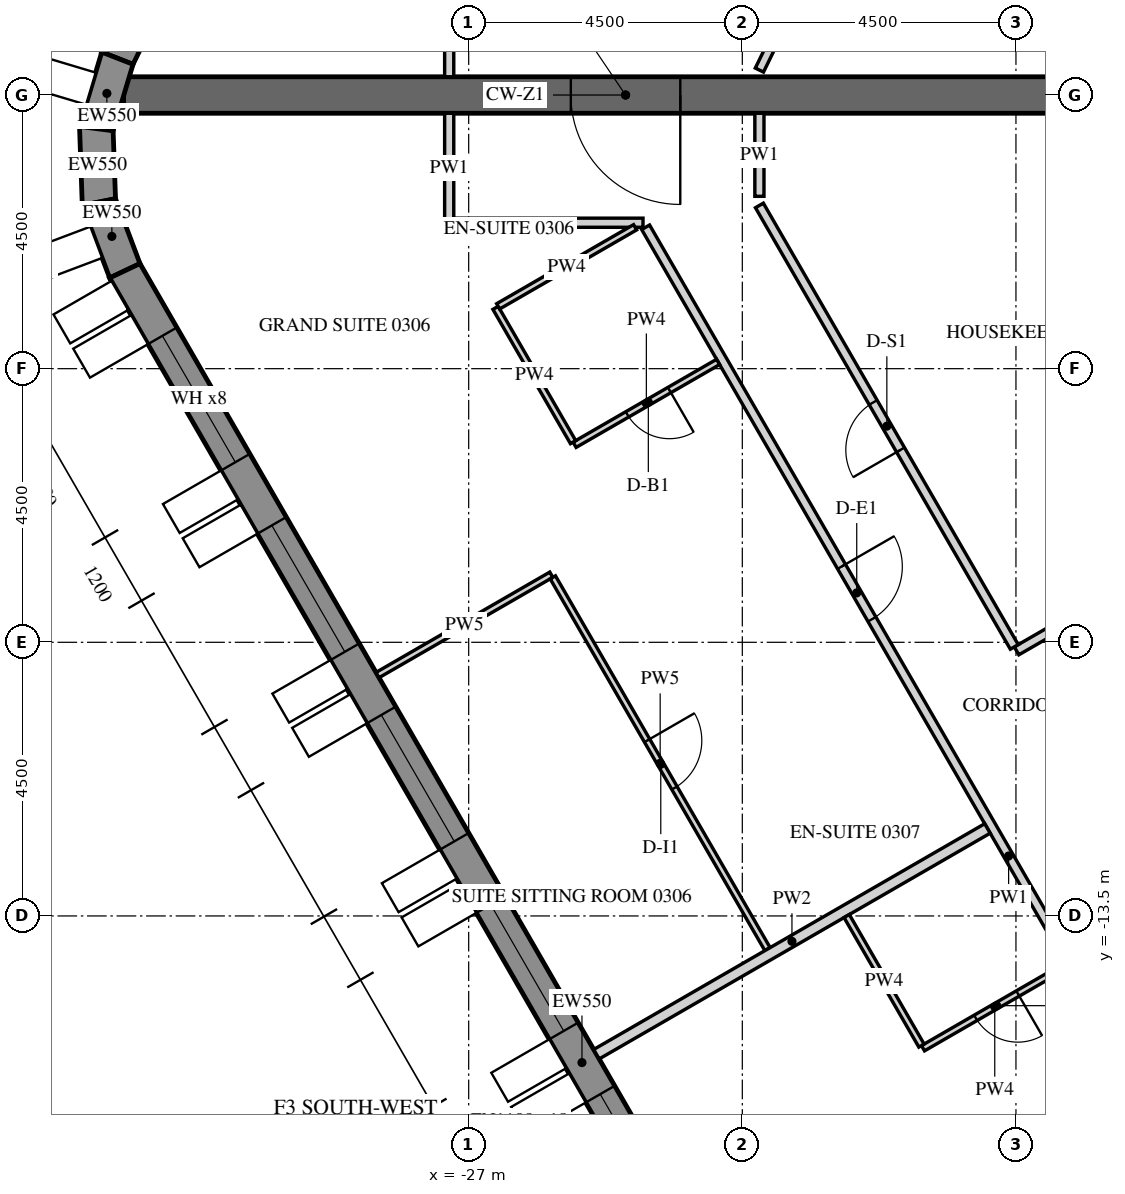
"""IFC4 building model, lengths in metres.
Left out: names, types, materials, properties, quantities, classifications, styles, units other than length and angle.
Written with IfcOpenShell. Run it as: python <this file> out.ifc"""

import sys

from ifc_helpers import new_model, si_unit, direction, frame, frame_2d, origin, place, context, subcontext, project, spatial, polyline, rectangle, outline, extrude, element, fill, save


model = new_model("IFC4")
c1 = context("Model", 3, precision=1e-05, world=origin(), true_north=direction((0.0, 1.0)))
c2 = subcontext(c1, "Body", "Model", "MODEL_VIEW")
j1 = project(units=[si_unit("LENGTHUNIT", "METRE"), si_unit("PLANEANGLEUNIT", "RADIAN")], contexts=[c1])
p1 = place(None, origin())
s1 = spatial("IfcSite", under=j1, at=p1, CompositionType="ELEMENT")
p2 = place(p1, origin())
s2 = spatial("IfcBuilding", under=s1, at=p2, CompositionType="ELEMENT")
p3 = place(p2, frame((0.0, 0.0, 60.9)))
s3 = spatial("IfcBuildingStorey", under=s2, at=p3, CompositionType="ELEMENT", Elevation=60.9)
p4 = place(p3, frame((-19.595, 27.633, -0.15), z_axis=(0.0, 0.0, 1.0), x_axis=(-0.438368285794, -0.898795441694, 0.0)))
e1 = element("IfcWall", 1, at=p4, inside=s3, PredefinedType="SOLIDWALL", context=c2, shape_type="SweptSolid", body=[
    extrude(outline(polyline([(-0.026, -0.275), (30.093, -0.275), (30.048, 0.275), (0.026, 0.275), (-0.026, -0.275)])), origin(), (0.0, 0.0, 1.0), 3.9),
])
p5 = place(p4, frame((1.236, 0.0, 1.05)))
e2 = element("IfcOpeningElement", 2, at=p5, cuts=e1, PredefinedType="OPENING", context=c2, shape_type="SweptSolid", body=[
    extrude(rectangle(XDim=2.4, YDim=2.4, at=frame_2d((1.2, 1.2))), frame((0.0, 0.285, 0.0), z_axis=(0.0, -1.0, 0.0), x_axis=(1.0, 0.0, 0.0)), (0.0, 0.0, 1.0), 0.57),
])
p6 = place(p4, frame((4.835, 0.0, 1.05)))
e3 = element("IfcOpeningElement", 3, at=p6, cuts=e1, PredefinedType="OPENING", context=c2, shape_type="SweptSolid", body=[
    extrude(rectangle(XDim=2.4, YDim=2.4, at=frame_2d((1.2, 1.2))), frame((0.0, 0.285, 0.0), z_axis=(0.0, -1.0, 0.0), x_axis=(1.0, 0.0, 0.0)), (0.0, 0.0, 1.0), 0.57),
])
p7 = place(p4, frame((8.436, 0.0, 1.05)))
e4 = element("IfcOpeningElement", 4, at=p7, cuts=e1, PredefinedType="OPENING", context=c2, shape_type="SweptSolid", body=[
    extrude(rectangle(XDim=2.4, YDim=2.4, at=frame_2d((1.2, 1.2))), frame((0.0, 0.285, 0.0), z_axis=(0.0, -1.0, 0.0), x_axis=(1.0, 0.0, 0.0)), (0.0, 0.0, 1.0), 0.57),
])
p8 = place(p4, frame((12.035, 0.0, 1.05)))
e5 = element("IfcOpeningElement", 5, at=p8, cuts=e1, PredefinedType="OPENING", context=c2, shape_type="SweptSolid", body=[
    extrude(rectangle(XDim=2.4, YDim=2.4, at=frame_2d((1.2, 1.2))), frame((0.0, 0.285, 0.0), z_axis=(0.0, -1.0, 0.0), x_axis=(1.0, 0.0, 0.0)), (0.0, 0.0, 1.0), 0.57),
])
p9 = place(p4, frame((15.635, 0.0, 1.05)))
e6 = element("IfcOpeningElement", 6, at=p9, cuts=e1, PredefinedType="OPENING", context=c2, shape_type="SweptSolid", body=[
    extrude(rectangle(XDim=2.4, YDim=2.4, at=frame_2d((1.2, 1.2))), frame((0.0, 0.285, 0.0), z_axis=(0.0, -1.0, 0.0), x_axis=(1.0, 0.0, 0.0)), (0.0, 0.0, 1.0), 0.57),
])
p10 = place(p4, frame((19.236, 0.0, 1.05)))
e7 = element("IfcOpeningElement", 7, at=p10, cuts=e1, PredefinedType="OPENING", context=c2, shape_type="SweptSolid", body=[
    extrude(rectangle(XDim=2.4, YDim=2.4, at=frame_2d((1.2, 1.2))), frame((0.0, 0.285, 0.0), z_axis=(0.0, -1.0, 0.0), x_axis=(1.0, 0.0, 0.0)), (0.0, 0.0, 1.0), 0.57),
])
p11 = place(p4, frame((22.835, 0.0, 1.05)))
e8 = element("IfcOpeningElement", 8, at=p11, cuts=e1, PredefinedType="OPENING", context=c2, shape_type="SweptSolid", body=[
    extrude(rectangle(XDim=2.4, YDim=2.4, at=frame_2d((1.2, 1.2))), frame((0.0, 0.285, 0.0), z_axis=(0.0, -1.0, 0.0), x_axis=(1.0, 0.0, 0.0)), (0.0, 0.0, 1.0), 0.57),
])
p12 = place(p4, frame((26.436, 0.0, 1.05)))
e9 = element("IfcOpeningElement", 9, at=p12, cuts=e1, PredefinedType="OPENING", context=c2, shape_type="SweptSolid", body=[
    extrude(rectangle(XDim=2.4, YDim=2.4, at=frame_2d((1.2, 1.2))), frame((0.0, 0.285, 0.0), z_axis=(0.0, -1.0, 0.0), x_axis=(1.0, 0.0, 0.0)), (0.0, 0.0, 1.0), 0.57),
])
p13 = place(p3, frame((-32.777, 0.605, -0.15), z_axis=(0.0, 0.0, 1.0), x_axis=(-0.286921497463, -0.957954098219, 0.0)))
e10 = element("IfcWall", 10, at=p13, inside=s3, PredefinedType="SOLIDWALL", context=c2, shape_type="SweptSolid", body=[
    extrude(outline(polyline([(-0.022, -0.275), (1.253, -0.275), (1.163, 0.275), (0.022, 0.275), (-0.022, -0.275)])), origin(), (0.0, 0.0, 1.0), 3.9),
])
p14 = place(p3, frame((-33.124, -0.552, -0.15), z_axis=(0.0, 0.0, 1.0), x_axis=(0.03495638276, -0.999388838893, 0.0)))
e11 = element("IfcWall", 11, at=p14, inside=s3, PredefinedType="SOLIDWALL", context=c2, shape_type="SweptSolid", body=[
    extrude(outline(polyline([(-0.045, -0.275), (1.253, -0.275), (1.163, 0.275), (0.045, 0.275), (-0.045, -0.275)])), origin(), (0.0, 0.0, 1.0), 3.9),
])
p15 = place(p3, frame((-33.081, -1.76, -0.15), z_axis=(0.0, 0.0, 1.0), x_axis=(0.353027214741, -0.935613053378, 0.0)))
e12 = element("IfcWall", 12, at=p15, inside=s3, PredefinedType="SOLIDWALL", context=c2, shape_type="SweptSolid", body=[
    extrude(outline(polyline([(-0.045, -0.275), (1.231, -0.275), (1.186, 0.275), (0.045, 0.275), (-0.045, -0.275)])), origin(), (0.0, 0.0, 1.0), 3.9),
])
p16 = place(p3, frame((-32.655, -2.89, -0.15), z_axis=(0.0, 0.0, 1.0), x_axis=(0.499997711317, -0.866026725152, 0.0)))
e13 = element("IfcWall", 13, at=p16, inside=s3, PredefinedType="SOLIDWALL", context=c2, shape_type="SweptSolid", body=[
    extrude(outline(polyline([(-0.022, -0.275), (30.097, -0.275), (30.045, 0.275), (0.022, 0.275), (-0.022, -0.275)])), origin(), (0.0, 0.0, 1.0), 3.9),
])
p17 = place(p16, frame((1.236, 0.0, 1.05)))
e14 = element("IfcOpeningElement", 14, at=p17, cuts=e13, PredefinedType="OPENING", context=c2, shape_type="SweptSolid", body=[
    extrude(rectangle(XDim=2.4, YDim=2.4, at=frame_2d((1.2, 1.2))), frame((0.0, 0.285, 0.0), z_axis=(0.0, -1.0, 0.0), x_axis=(1.0, 0.0, 0.0)), (0.0, 0.0, 1.0), 0.57),
])
p18 = place(p16, frame((4.835, 0.0, 1.05)))
e15 = element("IfcOpeningElement", 15, at=p18, cuts=e13, PredefinedType="OPENING", context=c2, shape_type="SweptSolid", body=[
    extrude(rectangle(XDim=2.4, YDim=2.4, at=frame_2d((1.2, 1.2))), frame((0.0, 0.285, 0.0), z_axis=(0.0, -1.0, 0.0), x_axis=(1.0, 0.0, 0.0)), (0.0, 0.0, 1.0), 0.57),
])
p19 = place(p16, frame((8.436, 0.0, 1.05)))
e16 = element("IfcOpeningElement", 16, at=p19, cuts=e13, PredefinedType="OPENING", context=c2, shape_type="SweptSolid", body=[
    extrude(rectangle(XDim=2.4, YDim=2.4, at=frame_2d((1.2, 1.2))), frame((0.0, 0.285, 0.0), z_axis=(0.0, -1.0, 0.0), x_axis=(1.0, 0.0, 0.0)), (0.0, 0.0, 1.0), 0.57),
])
p20 = place(p16, frame((12.035, 0.0, 1.05)))
e17 = element("IfcOpeningElement", 17, at=p20, cuts=e13, PredefinedType="OPENING", context=c2, shape_type="SweptSolid", body=[
    extrude(rectangle(XDim=2.4, YDim=2.4, at=frame_2d((1.2, 1.2))), frame((0.0, 0.285, 0.0), z_axis=(0.0, -1.0, 0.0), x_axis=(1.0, 0.0, 0.0)), (0.0, 0.0, 1.0), 0.57),
])
p21 = place(p16, frame((15.635, 0.0, 1.05)))
e18 = element("IfcOpeningElement", 18, at=p21, cuts=e13, PredefinedType="OPENING", context=c2, shape_type="SweptSolid", body=[
    extrude(rectangle(XDim=2.4, YDim=2.4, at=frame_2d((1.2, 1.2))), frame((0.0, 0.285, 0.0), z_axis=(0.0, -1.0, 0.0), x_axis=(1.0, 0.0, 0.0)), (0.0, 0.0, 1.0), 0.57),
])
p22 = place(p16, frame((19.236, 0.0, 1.05)))
e19 = element("IfcOpeningElement", 19, at=p22, cuts=e13, PredefinedType="OPENING", context=c2, shape_type="SweptSolid", body=[
    extrude(rectangle(XDim=2.4, YDim=2.4, at=frame_2d((1.2, 1.2))), frame((0.0, 0.285, 0.0), z_axis=(0.0, -1.0, 0.0), x_axis=(1.0, 0.0, 0.0)), (0.0, 0.0, 1.0), 0.57),
])
p23 = place(p16, frame((22.835, 0.0, 1.05)))
e20 = element("IfcOpeningElement", 20, at=p23, cuts=e13, PredefinedType="OPENING", context=c2, shape_type="SweptSolid", body=[
    extrude(rectangle(XDim=2.4, YDim=2.4, at=frame_2d((1.2, 1.2))), frame((0.0, 0.285, 0.0), z_axis=(0.0, -1.0, 0.0), x_axis=(1.0, 0.0, 0.0)), (0.0, 0.0, 1.0), 0.57),
])
p24 = place(p16, frame((26.436, 0.0, 1.05)))
e21 = element("IfcOpeningElement", 21, at=p24, cuts=e13, PredefinedType="OPENING", context=c2, shape_type="SweptSolid", body=[
    extrude(rectangle(XDim=2.4, YDim=2.4, at=frame_2d((1.2, 1.2))), frame((0.0, 0.285, 0.0), z_axis=(0.0, -1.0, 0.0), x_axis=(1.0, 0.0, 0.0)), (0.0, 0.0, 1.0), 0.57),
])
p25 = place(p3, frame((-16.166, 0.0, -0.15), z_axis=(0.0, 0.0, 1.0), x_axis=(-1.0, 0.0, 0.0)))
e22 = element("IfcWall", 22, at=p25, inside=s3, PredefinedType="SHEAR", context=c2, shape_type="SweptSolid", body=[
    extrude(rectangle(XDim=16.509, YDim=0.6, at=frame_2d((8.254, 0.0))), origin(), (0.0, 0.0, 1.0), 3.9),
])
p26 = place(p25, frame((7.354, 0.0, 0.15)))
e23 = element("IfcOpeningElement", 23, at=p26, cuts=e22, PredefinedType="OPENING", context=c2, shape_type="SweptSolid", body=[
    extrude(rectangle(XDim=1.8, YDim=2.4, at=frame_2d((0.9, 1.2))), frame((0.0, 0.31, 0.0), z_axis=(0.0, -1.0, 0.0), x_axis=(1.0, 0.0, 0.0)), (0.0, 0.0, 1.0), 0.62),
])
p27 = place(p3, frame((-27.32, 2.025, 0.0), z_axis=(0.0, 0.0, 1.0), x_axis=(0.0, -1.0, 0.0)))
e24 = element("IfcWall", 24, at=p27, inside=s3, PredefinedType="PARTITIONING", context=c2, shape_type="SweptSolid", body=[
    extrude(rectangle(XDim=1.725, YDim=0.15, at=frame_2d((0.862, 0.0))), origin(), (0.0, 0.0, 1.0), 2.988),
])
p28 = place(p3, frame((-22.219, 0.41, 0.0), z_axis=(0.0, 0.0, 1.0), x_axis=(0.438391891827, 0.898783927972, 0.0)))
e25 = element("IfcWall", 25, at=p28, inside=s3, PredefinedType="PARTITIONING", context=c2, shape_type="SweptSolid", body=[
    extrude(rectangle(XDim=9.699, YDim=0.15, at=frame_2d((4.85, 0.0))), origin(), (0.0, 0.0, 1.0), 2.988),
])
p29 = place(p28, frame((4.4, 0.0, 0.0)))
e26 = element("IfcOpeningElement", 26, at=p29, cuts=e25, PredefinedType="OPENING", context=c2, shape_type="SweptSolid", body=[
    extrude(rectangle(XDim=0.9, YDim=2.1, at=frame_2d((0.45, 1.05))), frame((0.0, 0.085, 0.0), z_axis=(0.0, -1.0, 0.0), x_axis=(1.0, 0.0, 0.0)), (0.0, 0.0, 1.0), 0.17),
])
p30 = place(p3, frame((-27.32, -0.3, 0.0), z_axis=(0.0, 0.0, 1.0), x_axis=(0.0, -1.0, 0.0)))
e27 = element("IfcWall", 27, at=p30, inside=s3, PredefinedType="PARTITIONING", context=c2, shape_type="SweptSolid", body=[
    extrude(rectangle(XDim=1.8, YDim=0.15, at=frame_2d((0.9, 0.0))), origin(), (0.0, 0.0, 1.0), 2.988),
])
p31 = place(p3, frame((-27.245, -2.1, 0.0), z_axis=(0.0, 0.0, 1.0), x_axis=(1.0, 0.0, 0.0)))
e28 = element("IfcWall", 28, at=p31, inside=s3, PredefinedType="PARTITIONING", context=c2, shape_type="SweptSolid", body=[
    extrude(rectangle(XDim=3.112, YDim=0.15, at=frame_2d((1.556, 0.0))), origin(), (0.0, 0.0, 1.0), 2.988),
])
p32 = place(p3, frame((-24.09, -2.175, 0.0), z_axis=(0.0, 0.0, 1.0), x_axis=(0.499996832073, -0.86602723278, 0.0)))
e29 = element("IfcWall", 29, at=p32, inside=s3, PredefinedType="PARTITIONING", context=c2, shape_type="SweptSolid", body=[
    extrude(rectangle(XDim=23.877, YDim=0.15, at=frame_2d((11.938, 0.0))), origin(), (0.0, 0.0, 1.0), 2.988),
])
p33 = place(p32, frame((6.443, 0.0, 0.0)))
e30 = element("IfcOpeningElement", 30, at=p33, cuts=e29, PredefinedType="OPENING", context=c2, shape_type="SweptSolid", body=[
    extrude(rectangle(XDim=1.0, YDim=2.1, at=frame_2d((0.5, 1.05))), frame((0.0, 0.085, 0.0), z_axis=(0.0, -1.0, 0.0), x_axis=(1.0, 0.0, 0.0)), (0.0, 0.0, 1.0), 0.17),
])
p34 = place(p32, frame((18.425, 0.0, 0.0)))
e31 = element("IfcOpeningElement", 31, at=p34, cuts=e29, PredefinedType="OPENING", context=c2, shape_type="SweptSolid", body=[
    extrude(rectangle(XDim=1.0, YDim=2.1, at=frame_2d((0.5, 1.05))), frame((0.0, 0.085, 0.0), z_axis=(0.0, -1.0, 0.0), x_axis=(1.0, 0.0, 0.0)), (0.0, 0.0, 1.0), 0.17),
])
p35 = place(p3, frame((-12.664, -6.066, 0.0), z_axis=(0.0, 0.0, 1.0), x_axis=(-0.866023618125, -0.500003092839, 0.0)))
e32 = element("IfcWall", 32, at=p35, inside=s3, PredefinedType="PARTITIONING", context=c2, shape_type="SweptSolid", body=[
    extrude(rectangle(XDim=6.15, YDim=0.15, at=frame_2d((3.075, 0.0))), origin(), (0.0, 0.0, 1.0), 2.988),
])
p36 = place(p3, frame((-18.027, -9.076, 0.0), z_axis=(0.0, 0.0, 1.0), x_axis=(-0.500007318041, 0.86602117867, 0.0)))
e33 = element("IfcWall", 33, at=p36, inside=s3, PredefinedType="PARTITIONING", context=c2, shape_type="SweptSolid", body=[
    extrude(rectangle(XDim=8.383, YDim=0.15, at=frame_2d((4.191, 0.0))), origin(), (0.0, 0.0, 1.0), 2.988),
])
p37 = place(p36, frame((3.742, 0.0, 0.0)))
e34 = element("IfcOpeningElement", 34, at=p37, cuts=e33, PredefinedType="OPENING", context=c2, shape_type="SweptSolid", body=[
    extrude(rectangle(XDim=0.9, YDim=2.1, at=frame_2d((0.45, 1.05))), frame((0.0, 0.085, 0.0), z_axis=(0.0, -1.0, 0.0), x_axis=(1.0, 0.0, 0.0)), (0.0, 0.0, 1.0), 0.17),
])
p38 = place(p3, frame((-22.219, -1.666, 0.0), z_axis=(0.0, 0.0, 1.0), x_axis=(0.0, 1.0, 0.0)))
e35 = element("IfcWall", 35, at=p38, inside=s3, PredefinedType="PARTITIONING", context=c2, shape_type="SweptSolid", body=[
    extrude(rectangle(XDim=1.366, YDim=0.15, at=frame_2d((0.683, 0.0))), origin(), (0.0, 0.0, 1.0), 2.988),
])
p39 = place(p3, frame((-22.898, -4.389, 0.0), z_axis=(0.0, 0.0, 1.0), x_axis=(-0.866012511928, -0.500022328685, 0.0)))
e36 = element("IfcWall", 36, at=p39, inside=s3, PredefinedType="PARTITIONING", context=c2, shape_type="SweptSolid", body=[
    extrude(rectangle(XDim=2.725, YDim=0.1, at=frame_2d((1.363, 0.0))), origin(), (0.0, 0.0, 1.0), 2.988),
])
p40 = place(p39, frame((0.925, 0.0, 0.0)))
e37 = element("IfcOpeningElement", 37, at=p40, cuts=e36, PredefinedType="OPENING", context=c2, shape_type="SweptSolid", body=[
    extrude(rectangle(XDim=0.8, YDim=2.1, at=frame_2d((0.4, 1.05))), frame((0.0, 0.06, 0.0), z_axis=(0.0, -1.0, 0.0), x_axis=(1.0, 0.0, 0.0)), (0.0, 0.0, 1.0), 0.12),
])
p41 = place(p3, frame((-25.283, -5.708, 0.0), z_axis=(0.0, 0.0, 1.0), x_axis=(-0.499990435942, 0.866030925526, 0.0)))
e38 = element("IfcWall", 38, at=p41, inside=s3, PredefinedType="PARTITIONING", context=c2, shape_type="SweptSolid", body=[
    extrude(rectangle(XDim=2.55, YDim=0.1, at=frame_2d((1.275, 0.0))), origin(), (0.0, 0.0, 1.0), 2.988),
])
p42 = place(p3, frame((-26.515, -3.475, 0.0), z_axis=(0.0, 0.0, 1.0), x_axis=(0.866021400173, 0.500006934395, 0.0)))
e39 = element("IfcWall", 39, at=p42, inside=s3, PredefinedType="PARTITIONING", context=c2, shape_type="SweptSolid", body=[
    extrude(rectangle(XDim=2.6, YDim=0.1, at=frame_2d((1.3, 0.0))), origin(), (0.0, 0.0, 1.0), 2.988),
])
p43 = place(p3, frame((-28.499, -9.538, 0.0), z_axis=(0.0, 0.0, 1.0), x_axis=(0.866040211805, 0.499974350878, 0.0)))
e40 = element("IfcWall", 40, at=p43, inside=s3, PredefinedType="PARTITIONING", context=c2, shape_type="SweptSolid", body=[
    extrude(rectangle(XDim=3.3, YDim=0.1, at=frame_2d((1.65, 0.0))), origin(), (0.0, 0.0, 1.0), 2.988),
])
p44 = place(p3, frame((-25.616, -7.932, 0.0), z_axis=(0.0, 0.0, 1.0), x_axis=(0.499995846692, -0.866027801685, 0.0)))
e41 = element("IfcWall", 41, at=p44, inside=s3, PredefinedType="PARTITIONING", context=c2, shape_type="SweptSolid", body=[
    extrude(rectangle(XDim=7.06, YDim=0.1, at=frame_2d((3.53, 0.0))), origin(), (0.0, 0.0, 1.0), 2.988),
])
p45 = place(p44, frame((3.1, 0.0, 0.0)))
e42 = element("IfcOpeningElement", 42, at=p45, cuts=e41, PredefinedType="OPENING", context=c2, shape_type="SweptSolid", body=[
    extrude(rectangle(XDim=0.9, YDim=2.1, at=frame_2d((0.45, 1.05))), frame((0.0, 0.06, 0.0), z_axis=(0.0, -1.0, 0.0), x_axis=(1.0, 0.0, 0.0)), (0.0, 0.0, 1.0), 0.12),
])
p46 = place(p3, frame((-24.899, -15.774, 0.0), z_axis=(0.0, 0.0, 1.0), x_axis=(0.866028983062, 0.499993800457, 0.0)))
e43 = element("IfcWall", 43, at=p46, inside=s3, PredefinedType="PARTITIONING", context=c2, shape_type="SweptSolid", body=[
    extrude(rectangle(XDim=7.425, YDim=0.18, at=frame_2d((3.712, 0.0))), origin(), (0.0, 0.0, 1.0), 2.988),
])
p47 = place(p3, frame((-17.169, -14.313, 0.0), z_axis=(0.0, 0.0, 1.0), x_axis=(-0.866012511928, -0.500022328685, 0.0)))
e44 = element("IfcWall", 44, at=p47, inside=s3, PredefinedType="PARTITIONING", context=c2, shape_type="SweptSolid", body=[
    extrude(rectangle(XDim=2.725, YDim=0.1, at=frame_2d((1.363, 0.0))), origin(), (0.0, 0.0, 1.0), 2.988),
])
p48 = place(p47, frame((0.925, 0.0, 0.0)))
e45 = element("IfcOpeningElement", 45, at=p48, cuts=e44, PredefinedType="OPENING", context=c2, shape_type="SweptSolid", body=[
    extrude(rectangle(XDim=0.8, YDim=2.1, at=frame_2d((0.4, 1.05))), frame((0.0, 0.06, 0.0), z_axis=(0.0, -1.0, 0.0), x_axis=(1.0, 0.0, 0.0)), (0.0, 0.0, 1.0), 0.12),
])
p49 = place(p3, frame((-19.554, -15.632, 0.0), z_axis=(0.0, 0.0, 1.0), x_axis=(-0.500003092839, 0.866023618125, 0.0)))
e46 = element("IfcWall", 46, at=p49, inside=s3, PredefinedType="PARTITIONING", context=c2, shape_type="SweptSolid", body=[
    extrude(rectangle(XDim=2.46, YDim=0.1, at=frame_2d((1.23, 0.0))), origin(), (0.0, 0.0, 1.0), 2.988),
])
p50 = place(p17, frame((0.0, 0.205, 0.0)))
e47 = element("IfcWindow", 47, at=p50, inside=s3, PartitioningType="DOUBLE_PANEL_VERTICAL", PredefinedType="WINDOW", context=c2, shape_type="SweptSolid", body=[
    extrude(rectangle(XDim=2.4, YDim=2.4, at=frame_2d((1.2, 1.2))), frame((0.0, 0.03, 0.0), z_axis=(0.0, -1.0, 0.0), x_axis=(1.0, 0.0, 0.0)), (0.0, 0.0, 1.0), 0.06),
])
fill(e14, e47)
p51 = place(p18, frame((0.0, 0.205, 0.0)))
e48 = element("IfcWindow", 48, at=p51, inside=s3, PartitioningType="DOUBLE_PANEL_VERTICAL", PredefinedType="WINDOW", context=c2, shape_type="SweptSolid", body=[
    extrude(rectangle(XDim=2.4, YDim=2.4, at=frame_2d((1.2, 1.2))), frame((0.0, 0.03, 0.0), z_axis=(0.0, -1.0, 0.0), x_axis=(1.0, 0.0, 0.0)), (0.0, 0.0, 1.0), 0.06),
])
fill(e15, e48)
p52 = place(p19, frame((0.0, 0.205, 0.0)))
e49 = element("IfcWindow", 49, at=p52, inside=s3, PartitioningType="DOUBLE_PANEL_VERTICAL", PredefinedType="WINDOW", context=c2, shape_type="SweptSolid", body=[
    extrude(rectangle(XDim=2.4, YDim=2.4, at=frame_2d((1.2, 1.2))), frame((0.0, 0.03, 0.0), z_axis=(0.0, -1.0, 0.0), x_axis=(1.0, 0.0, 0.0)), (0.0, 0.0, 1.0), 0.06),
])
fill(e16, e49)
p53 = place(p20, frame((0.0, 0.205, 0.0)))
e50 = element("IfcWindow", 50, at=p53, inside=s3, PartitioningType="DOUBLE_PANEL_VERTICAL", PredefinedType="WINDOW", context=c2, shape_type="SweptSolid", body=[
    extrude(rectangle(XDim=2.4, YDim=2.4, at=frame_2d((1.2, 1.2))), frame((0.0, 0.03, 0.0), z_axis=(0.0, -1.0, 0.0), x_axis=(1.0, 0.0, 0.0)), (0.0, 0.0, 1.0), 0.06),
])
fill(e17, e50)
p54 = place(p21, frame((0.0, 0.205, 0.0)))
e51 = element("IfcWindow", 51, at=p54, inside=s3, PartitioningType="DOUBLE_PANEL_VERTICAL", PredefinedType="WINDOW", context=c2, shape_type="SweptSolid", body=[
    extrude(rectangle(XDim=2.4, YDim=2.4, at=frame_2d((1.2, 1.2))), frame((0.0, 0.03, 0.0), z_axis=(0.0, -1.0, 0.0), x_axis=(1.0, 0.0, 0.0)), (0.0, 0.0, 1.0), 0.06),
])
fill(e18, e51)
p55 = place(p26, origin())
e52 = element("IfcDoor", 52, at=p55, inside=s3, OperationType="DOUBLE_DOOR_SINGLE_SWING", PredefinedType="DOOR", context=c2, shape_type="SweptSolid", body=[
    extrude(rectangle(XDim=1.8, YDim=2.4, at=frame_2d((0.9, 1.2))), frame((0.0, 0.025, 0.0), z_axis=(0.0, -1.0, 0.0), x_axis=(1.0, 0.0, 0.0)), (0.0, 0.0, 1.0), 0.05),
])
fill(e23, e52)
p56 = place(p33, origin())
e53 = element("IfcDoor", 53, at=p56, inside=s3, OperationType="SINGLE_SWING_LEFT", PredefinedType="DOOR", context=c2, shape_type="SweptSolid", body=[
    extrude(rectangle(XDim=1.0, YDim=2.1, at=frame_2d((0.5, 1.05))), frame((0.0, 0.025, 0.0), z_axis=(0.0, -1.0, 0.0), x_axis=(1.0, 0.0, 0.0)), (0.0, 0.0, 1.0), 0.05),
])
fill(e30, e53)
p57 = place(p40, origin())
e54 = element("IfcDoor", 54, at=p57, inside=s3, OperationType="SINGLE_SWING_RIGHT", PredefinedType="DOOR", context=c2, shape_type="SweptSolid", body=[
    extrude(rectangle(XDim=0.8, YDim=2.1, at=frame_2d((0.4, 1.05))), frame((0.0, 0.025, 0.0), z_axis=(0.0, -1.0, 0.0), x_axis=(1.0, 0.0, 0.0)), (0.0, 0.0, 1.0), 0.05),
])
fill(e37, e54)
p58 = place(p45, origin())
e55 = element("IfcDoor", 55, at=p58, inside=s3, OperationType="SINGLE_SWING_RIGHT", PredefinedType="DOOR", context=c2, shape_type="SweptSolid", body=[
    extrude(rectangle(XDim=0.9, YDim=2.1, at=frame_2d((0.45, 1.05))), frame((0.0, 0.025, 0.0), z_axis=(0.0, -1.0, 0.0), x_axis=(1.0, 0.0, 0.0)), (0.0, 0.0, 1.0), 0.05),
])
fill(e42, e55)
p59 = place(p48, origin())
e56 = element("IfcDoor", 56, at=p59, inside=s3, OperationType="SINGLE_SWING_RIGHT", PredefinedType="DOOR", context=c2, shape_type="SweptSolid", body=[
    extrude(rectangle(XDim=0.8, YDim=2.1, at=frame_2d((0.4, 1.05))), frame((0.0, 0.025, 0.0), z_axis=(0.0, -1.0, 0.0), x_axis=(1.0, 0.0, 0.0)), (0.0, 0.0, 1.0), 0.05),
])
fill(e45, e56)
p60 = place(p37, origin())
e57 = element("IfcDoor", 57, at=p60, inside=s3, OperationType="SINGLE_SWING_RIGHT", PredefinedType="DOOR", context=c2, shape_type="SweptSolid", body=[
    extrude(rectangle(XDim=0.9, YDim=2.1, at=frame_2d((0.45, 1.05))), frame((0.0, 0.025, 0.0), z_axis=(0.0, -1.0, 0.0), x_axis=(1.0, 0.0, 0.0)), (0.0, 0.0, 1.0), 0.05),
])
fill(e34, e57)
save(model, sys.argv[1])
